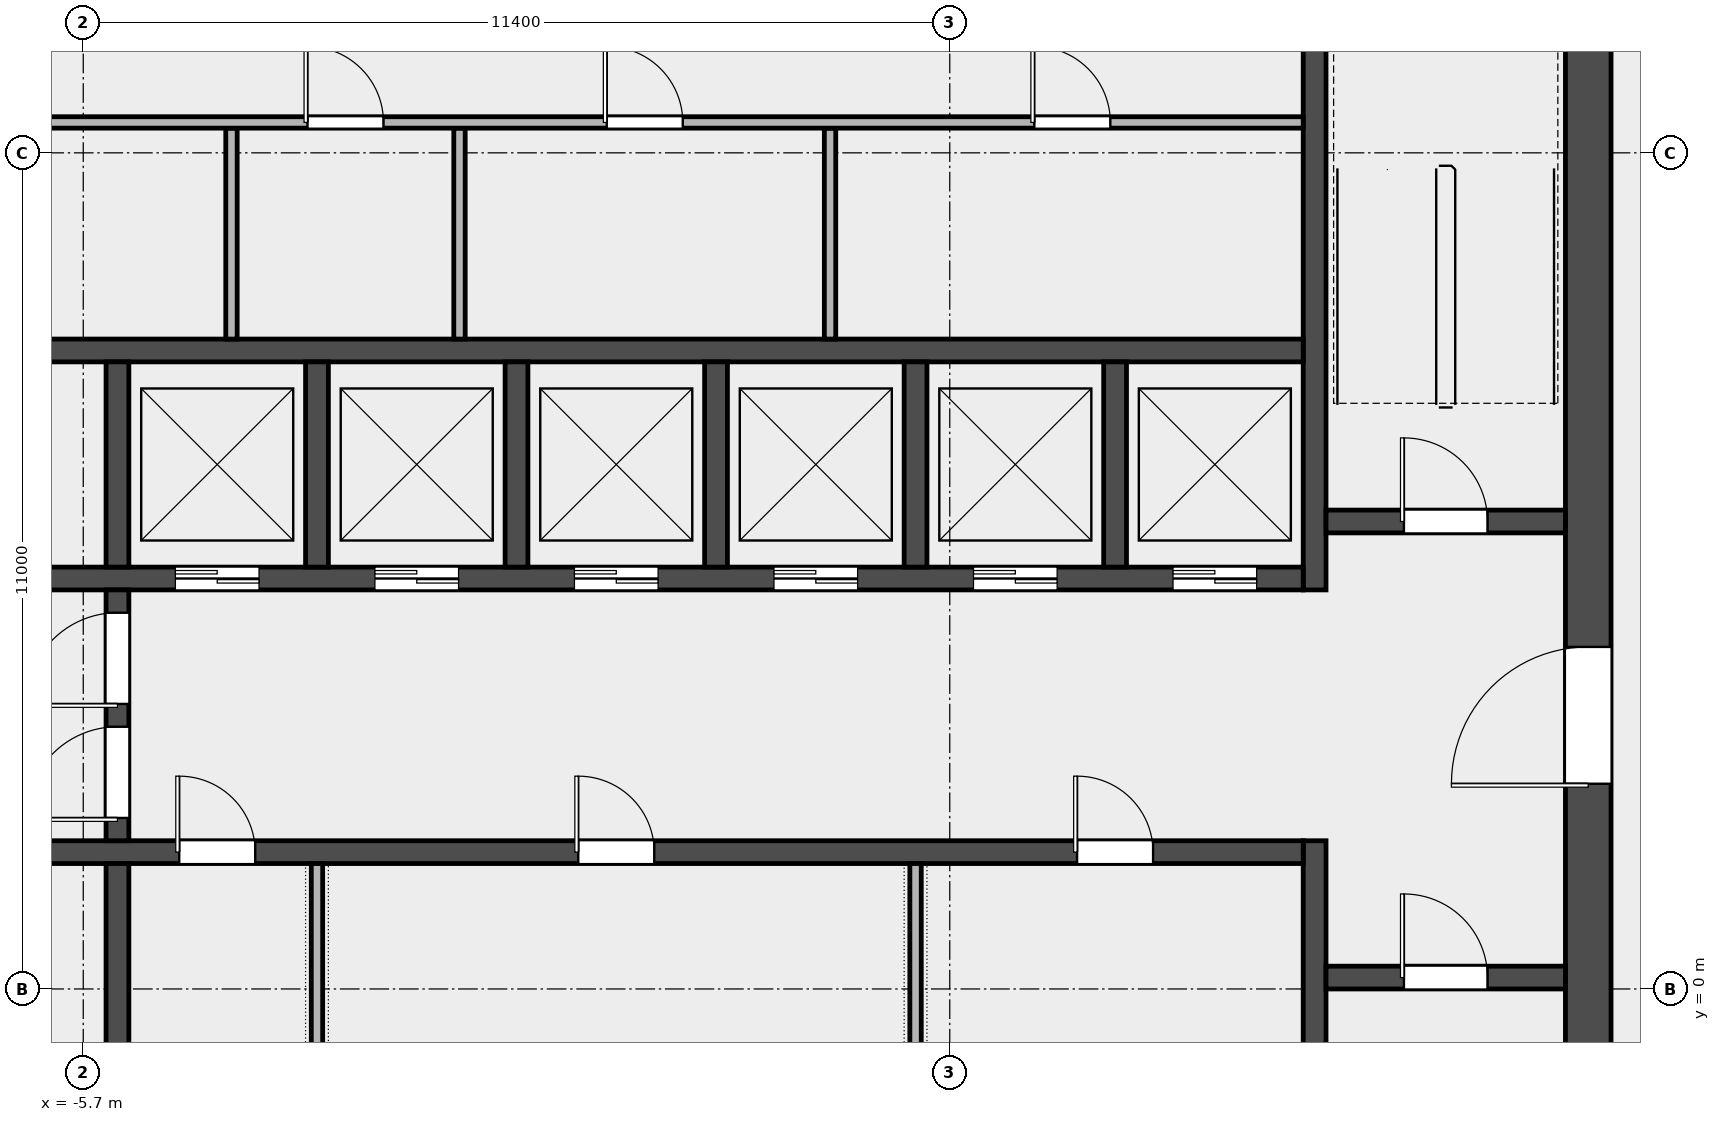
"""IFC4 building model, lengths in metres.
Left out: names, types, materials, properties, quantities, classifications, styles, units other than length and angle.
Written with IfcOpenShell. Run it as: python <this file> out.ifc"""

import sys

from ifc_helpers import new_model, si_unit, direction, frame, frame_2d, origin, place, context, subcontext, project, spatial, rectangle, extrude, element, fill, save


model = new_model("IFC4")
c1 = context("Model", 3, precision=1e-05, world=origin(), true_north=direction((0.0, 1.0)))
c2 = subcontext(c1, "Body", "Model", "MODEL_VIEW")
j1 = project(units=[si_unit("LENGTHUNIT", "METRE"), si_unit("PLANEANGLEUNIT", "RADIAN")], contexts=[c1])
p1 = place(None, origin())
s1 = spatial("IfcSite", under=j1, at=p1, CompositionType="ELEMENT")
p2 = place(p1, origin())
s2 = spatial("IfcBuilding", under=s1, at=p2, CompositionType="ELEMENT")
p3 = place(p2, frame((0.0, 0.0, 283.4)))
s3 = spatial("IfcBuildingStorey", under=s2, at=p3, CompositionType="ELEMENT", Elevation=283.4)
p4 = place(p3, frame((14.1, -6.6, 0.0), z_axis=(0.0, 0.0, 1.0), x_axis=(0.0, 1.0, 0.0)))
e1 = element("IfcWall", 1, at=p4, inside=s3, PredefinedType="SHEAR", context=c2, shape_type="SweptSolid", body=[
    extrude(rectangle(XDim=19.5, YDim=0.6, at=frame_2d((9.75, 0.0))), origin(), (0.0, 0.0, 1.0), 3.7),
])
p5 = place(p4, frame((9.3, 0.0, 0.0)))
e2 = element("IfcOpeningElement", 2, at=p5, cuts=e1, PredefinedType="OPENING", context=c2, shape_type="SweptSolid", body=[
    extrude(rectangle(XDim=1.8, YDim=2.1, at=frame_2d((0.9, 1.05))), frame((0.0, 0.312, 0.0), z_axis=(0.0, -1.0, 0.0), x_axis=(1.0, 0.0, 0.0)), (0.0, 0.0, 1.0), 0.624),
])
p6 = place(p3, frame((10.5, -6.6, 0.0), z_axis=(0.0, 0.0, 1.0), x_axis=(0.0, 1.0, 0.0)))
e3 = element("IfcWall", 3, at=p6, inside=s3, PredefinedType="SHEAR", context=c2, shape_type="SweptSolid", body=[
    extrude(rectangle(XDim=8.55, YDim=0.3, at=frame_2d((4.275, 0.0))), origin(), (0.0, 0.0, 1.0), 3.7),
])
p7 = place(p3, frame((10.5, 5.25, 0.0), z_axis=(0.0, 0.0, 1.0), x_axis=(0.0, 1.0, 0.0)))
e4 = element("IfcWall", 4, at=p7, inside=s3, PredefinedType="SHEAR", context=c2, shape_type="SweptSolid", body=[
    extrude(rectangle(XDim=7.65, YDim=0.3, at=frame_2d((3.825, 0.0))), origin(), (0.0, 0.0, 1.0), 3.7),
])
p8 = place(p3, frame((10.65, 0.15, 0.0), z_axis=(0.0, 0.0, 1.0), x_axis=(1.0, 0.0, 0.0)))
e5 = element("IfcWall", 5, at=p8, inside=s3, PredefinedType="SOLIDWALL", context=c2, shape_type="SweptSolid", body=[
    extrude(rectangle(XDim=3.15, YDim=0.3, at=frame_2d((1.575, 0.0))), origin(), (0.0, 0.0, 1.0), 3.7),
])
p9 = place(p8, frame((1.025, 0.0, 0.0)))
e6 = element("IfcOpeningElement", 6, at=p9, cuts=e5, PredefinedType="OPENING", context=c2, shape_type="SweptSolid", body=[
    extrude(rectangle(XDim=1.1, YDim=2.1, at=frame_2d((0.55, 1.05))), frame((0.0, 0.162, 0.0), z_axis=(0.0, -1.0, 0.0), x_axis=(1.0, 0.0, 0.0)), (0.0, 0.0, 1.0), 0.324),
])
p10 = place(p3, frame((10.65, 6.15, 0.0), z_axis=(0.0, 0.0, 1.0), x_axis=(1.0, 0.0, 0.0)))
e7 = element("IfcWall", 7, at=p10, inside=s3, PredefinedType="SOLIDWALL", context=c2, shape_type="SweptSolid", body=[
    extrude(rectangle(XDim=3.15, YDim=0.3, at=frame_2d((1.575, 0.0))), origin(), (0.0, 0.0, 1.0), 3.7),
])
p11 = place(p10, frame((1.025, 0.0, 0.0)))
e8 = element("IfcOpeningElement", 8, at=p11, cuts=e7, PredefinedType="OPENING", context=c2, shape_type="SweptSolid", body=[
    extrude(rectangle(XDim=1.1, YDim=2.1, at=frame_2d((0.55, 1.05))), frame((0.0, 0.162, 0.0), z_axis=(0.0, -1.0, 0.0), x_axis=(1.0, 0.0, 0.0)), (0.0, 0.0, 1.0), 0.324),
])
p12 = place(p3, frame((-10.35, 1.8, 0.0), z_axis=(0.0, 0.0, 1.0), x_axis=(1.0, 0.0, 0.0)))
e9 = element("IfcWall", 9, at=p12, inside=s3, PredefinedType="SOLIDWALL", context=c2, shape_type="SweptSolid", body=[
    extrude(rectangle(XDim=20.7, YDim=0.3, at=frame_2d((10.35, 0.0))), origin(), (0.0, 0.0, 1.0), 3.7),
])
p13 = place(p12, frame((0.512, 0.0, 0.0)))
e10 = element("IfcOpeningElement", 10, at=p13, cuts=e9, PredefinedType="OPENING", context=c2, shape_type="SweptSolid", body=[
    extrude(rectangle(XDim=1.3, YDim=2.1, at=frame_2d((0.65, 1.05))), frame((0.0, 0.162, 0.0), z_axis=(0.0, -1.0, 0.0), x_axis=(1.0, 0.0, 0.0)), (0.0, 0.0, 1.0), 0.324),
])
p14 = place(p12, frame((5.913, 0.0, 0.0)))
e11 = element("IfcOpeningElement", 11, at=p14, cuts=e9, PredefinedType="OPENING", context=c2, shape_type="SweptSolid", body=[
    extrude(rectangle(XDim=1.0, YDim=2.1, at=frame_2d((0.5, 1.05))), frame((0.0, 0.162, 0.0), z_axis=(0.0, -1.0, 0.0), x_axis=(1.0, 0.0, 0.0)), (0.0, 0.0, 1.0), 0.324),
])
p15 = place(p12, frame((11.163, 0.0, 0.0)))
e12 = element("IfcOpeningElement", 12, at=p15, cuts=e9, PredefinedType="OPENING", context=c2, shape_type="SweptSolid", body=[
    extrude(rectangle(XDim=1.0, YDim=2.1, at=frame_2d((0.5, 1.05))), frame((0.0, 0.162, 0.0), z_axis=(0.0, -1.0, 0.0), x_axis=(1.0, 0.0, 0.0)), (0.0, 0.0, 1.0), 0.324),
])
p16 = place(p12, frame((17.725, 0.0, 0.0)))
e13 = element("IfcOpeningElement", 13, at=p16, cuts=e9, PredefinedType="OPENING", context=c2, shape_type="SweptSolid", body=[
    extrude(rectangle(XDim=1.0, YDim=2.1, at=frame_2d((0.5, 1.05))), frame((0.0, 0.162, 0.0), z_axis=(0.0, -1.0, 0.0), x_axis=(1.0, 0.0, 0.0)), (0.0, 0.0, 1.0), 0.324),
])
p17 = place(p3, frame((-10.35, 5.4, 0.0), z_axis=(0.0, 0.0, 1.0), x_axis=(1.0, 0.0, 0.0)))
e14 = element("IfcWall", 14, at=p17, inside=s3, PredefinedType="SOLIDWALL", context=c2, shape_type="SweptSolid", body=[
    extrude(rectangle(XDim=20.7, YDim=0.3, at=frame_2d((10.35, 0.0))), origin(), (0.0, 0.0, 1.0), 3.7),
])
p18 = place(p17, frame((0.512, 0.0, 0.0)))
e15 = element("IfcOpeningElement", 15, at=p18, cuts=e14, PredefinedType="OPENING", context=c2, shape_type="SweptSolid", body=[
    extrude(rectangle(XDim=1.3, YDim=2.1, at=frame_2d((0.65, 1.05))), frame((0.0, 0.162, 0.0), z_axis=(0.0, -1.0, 0.0), x_axis=(1.0, 0.0, 0.0)), (0.0, 0.0, 1.0), 0.324),
])
p19 = place(p17, frame((5.863, 0.0, 0.0)))
e16 = element("IfcOpeningElement", 16, at=p19, cuts=e14, PredefinedType="OPENING", context=c2, shape_type="SweptSolid", body=[
    extrude(rectangle(XDim=1.1, YDim=2.1, at=frame_2d((0.55, 1.05))), frame((0.0, 0.162, 0.0), z_axis=(0.0, -1.0, 0.0), x_axis=(1.0, 0.0, 0.0)), (0.0, 0.0, 1.0), 0.324),
])
p20 = place(p17, frame((8.488, 0.0, 0.0)))
e17 = element("IfcOpeningElement", 17, at=p20, cuts=e14, PredefinedType="OPENING", context=c2, shape_type="SweptSolid", body=[
    extrude(rectangle(XDim=1.1, YDim=2.1, at=frame_2d((0.55, 1.05))), frame((0.0, 0.162, 0.0), z_axis=(0.0, -1.0, 0.0), x_axis=(1.0, 0.0, 0.0)), (0.0, 0.0, 1.0), 0.324),
])
p21 = place(p17, frame((11.113, 0.0, 0.0)))
e18 = element("IfcOpeningElement", 18, at=p21, cuts=e14, PredefinedType="OPENING", context=c2, shape_type="SweptSolid", body=[
    extrude(rectangle(XDim=1.1, YDim=2.1, at=frame_2d((0.55, 1.05))), frame((0.0, 0.162, 0.0), z_axis=(0.0, -1.0, 0.0), x_axis=(1.0, 0.0, 0.0)), (0.0, 0.0, 1.0), 0.324),
])
p22 = place(p17, frame((13.738, 0.0, 0.0)))
e19 = element("IfcOpeningElement", 19, at=p22, cuts=e14, PredefinedType="OPENING", context=c2, shape_type="SweptSolid", body=[
    extrude(rectangle(XDim=1.1, YDim=2.1, at=frame_2d((0.55, 1.05))), frame((0.0, 0.162, 0.0), z_axis=(0.0, -1.0, 0.0), x_axis=(1.0, 0.0, 0.0)), (0.0, 0.0, 1.0), 0.324),
])
p23 = place(p17, frame((16.363, 0.0, 0.0)))
e20 = element("IfcOpeningElement", 20, at=p23, cuts=e14, PredefinedType="OPENING", context=c2, shape_type="SweptSolid", body=[
    extrude(rectangle(XDim=1.1, YDim=2.1, at=frame_2d((0.55, 1.05))), frame((0.0, 0.162, 0.0), z_axis=(0.0, -1.0, 0.0), x_axis=(1.0, 0.0, 0.0)), (0.0, 0.0, 1.0), 0.324),
])
p24 = place(p17, frame((18.988, 0.0, 0.0)))
e21 = element("IfcOpeningElement", 21, at=p24, cuts=e14, PredefinedType="OPENING", context=c2, shape_type="SweptSolid", body=[
    extrude(rectangle(XDim=1.1, YDim=2.1, at=frame_2d((0.55, 1.05))), frame((0.0, 0.162, 0.0), z_axis=(0.0, -1.0, 0.0), x_axis=(1.0, 0.0, 0.0)), (0.0, 0.0, 1.0), 0.324),
])
p25 = place(p3, frame((-10.35, 8.4, 0.0), z_axis=(0.0, 0.0, 1.0), x_axis=(1.0, 0.0, 0.0)))
e22 = element("IfcWall", 22, at=p25, inside=s3, PredefinedType="SOLIDWALL", context=c2, shape_type="SweptSolid", body=[
    extrude(rectangle(XDim=20.7, YDim=0.3, at=frame_2d((10.35, 0.0))), origin(), (0.0, 0.0, 1.0), 3.7),
])
for number, where, z_axis, x_axis in (
    (23, (-5.25, -1.05, 0.0), (0.0, 0.0, 1.0), (0.0, 1.0, 0.0)),
    (24, (-5.25, 5.55, 0.0), (0.0, 0.0, 1.0), (0.0, 1.0, 0.0)),
    (25, (-2.625, 5.55, 0.0), (0.0, 0.0, 1.0), (0.0, 1.0, 0.0)),
    (26, (0.0, 5.55, 0.0), (0.0, 0.0, 1.0), (0.0, 1.0, 0.0)),
    (27, (2.625, 5.55, 0.0), (0.0, 0.0, 1.0), (0.0, 1.0, 0.0)),
    (28, (5.25, 5.55, 0.0), (0.0, 0.0, 1.0), (0.0, 1.0, 0.0)),
    (29, (7.875, 5.55, 0.0), (0.0, 0.0, 1.0), (0.0, 1.0, 0.0)),
):
    element("IfcWall", number, at=place(p3, frame(where, z_axis=z_axis, x_axis=x_axis)), inside=s3, PredefinedType="SOLIDWALL", context=c2, shape_type="SweptSolid", body=[
        extrude(rectangle(XDim=2.7, YDim=0.3, at=frame_2d((1.35, 0.0))), origin(), (0.0, 0.0, 1.0), 3.7),
    ])
p26 = place(p3, frame((-5.25, 1.95, 0.0), z_axis=(0.0, 0.0, 1.0), x_axis=(0.0, 1.0, 0.0)))
e30 = element("IfcWall", 30, at=p26, inside=s3, PredefinedType="SOLIDWALL", context=c2, shape_type="SweptSolid", body=[
    extrude(rectangle(XDim=3.3, YDim=0.3, at=frame_2d((1.65, 0.0))), origin(), (0.0, 0.0, 1.0), 3.7),
])
p27 = place(p26, frame((0.3, 0.0, 0.0)))
e31 = element("IfcOpeningElement", 31, at=p27, cuts=e30, PredefinedType="OPENING", context=c2, shape_type="SweptSolid", body=[
    extrude(rectangle(XDim=1.2, YDim=2.1, at=frame_2d((0.6, 1.05))), frame((0.0, 0.162, 0.0), z_axis=(0.0, -1.0, 0.0), x_axis=(1.0, 0.0, 0.0)), (0.0, 0.0, 1.0), 0.324),
])
p28 = place(p26, frame((1.8, 0.0, 0.0)))
e32 = element("IfcOpeningElement", 32, at=p28, cuts=e30, PredefinedType="OPENING", context=c2, shape_type="SweptSolid", body=[
    extrude(rectangle(XDim=1.2, YDim=2.1, at=frame_2d((0.6, 1.05))), frame((0.0, 0.162, 0.0), z_axis=(0.0, -1.0, 0.0), x_axis=(1.0, 0.0, 0.0)), (0.0, 0.0, 1.0), 0.324),
])
for number, where, z_axis, x_axis in (
    (33, (-3.75, 8.55, 0.0), (0.0, 0.0, 1.0), (0.0, 1.0, 0.0)),
    (34, (-0.75, 8.55, 0.0), (0.0, 0.0, 1.0), (0.0, 1.0, 0.0)),
    (35, (4.125, 8.55, 0.0), (0.0, 0.0, 1.0), (0.0, 1.0, 0.0)),
):
    element("IfcWall", number, at=place(p3, frame(where, z_axis=z_axis, x_axis=x_axis)), inside=s3, PredefinedType="PARTITIONING", context=c2, shape_type="SweptSolid", body=[
        extrude(rectangle(XDim=2.775, YDim=0.15, at=frame_2d((1.387, 0.0))), origin(), (0.0, 0.0, 1.0), 3.7),
    ])
p29 = place(p3, frame((-10.35, 11.4, 0.0), z_axis=(0.0, 0.0, 1.0), x_axis=(1.0, 0.0, 0.0)))
e36 = element("IfcWall", 36, at=p29, inside=s3, PredefinedType="PARTITIONING", context=c2, shape_type="SweptSolid", body=[
    extrude(rectangle(XDim=20.7, YDim=0.15, at=frame_2d((10.35, 0.0))), origin(), (0.0, 0.0, 1.0), 3.7),
])
p30 = place(p29, frame((2.725, 0.0, 0.0)))
e37 = element("IfcOpeningElement", 37, at=p30, cuts=e36, PredefinedType="OPENING", context=c2, shape_type="SweptSolid", body=[
    extrude(rectangle(XDim=1.0, YDim=2.1, at=frame_2d((0.5, 1.05))), frame((0.0, 0.087, 0.0), z_axis=(0.0, -1.0, 0.0), x_axis=(1.0, 0.0, 0.0)), (0.0, 0.0, 1.0), 0.174),
])
p31 = place(p29, frame((7.6, 0.0, 0.0)))
e38 = element("IfcOpeningElement", 38, at=p31, cuts=e36, PredefinedType="OPENING", context=c2, shape_type="SweptSolid", body=[
    extrude(rectangle(XDim=1.0, YDim=2.1, at=frame_2d((0.5, 1.05))), frame((0.0, 0.087, 0.0), z_axis=(0.0, -1.0, 0.0), x_axis=(1.0, 0.0, 0.0)), (0.0, 0.0, 1.0), 0.174),
])
p32 = place(p29, frame((11.538, 0.0, 0.0)))
e39 = element("IfcOpeningElement", 39, at=p32, cuts=e36, PredefinedType="OPENING", context=c2, shape_type="SweptSolid", body=[
    extrude(rectangle(XDim=1.0, YDim=2.1, at=frame_2d((0.5, 1.05))), frame((0.0, 0.087, 0.0), z_axis=(0.0, -1.0, 0.0), x_axis=(1.0, 0.0, 0.0)), (0.0, 0.0, 1.0), 0.174),
])
p33 = place(p29, frame((17.163, 0.0, 0.0)))
e40 = element("IfcOpeningElement", 40, at=p33, cuts=e36, PredefinedType="OPENING", context=c2, shape_type="SweptSolid", body=[
    extrude(rectangle(XDim=1.0, YDim=2.1, at=frame_2d((0.5, 1.05))), frame((0.0, 0.087, 0.0), z_axis=(0.0, -1.0, 0.0), x_axis=(1.0, 0.0, 0.0)), (0.0, 0.0, 1.0), 0.174),
])
for number, where, z_axis, x_axis in (
    (41, (-2.625, -1.05, 0.0), (0.0, 0.0, 1.0), (0.0, 1.0, 0.0)),
    (42, (5.25, -1.05, 0.0), (0.0, 0.0, 1.0), (0.0, 1.0, 0.0)),
):
    element("IfcWall", number, at=place(p3, frame(where, z_axis=z_axis, x_axis=x_axis)), inside=s3, PredefinedType="PARTITIONING", context=c2, shape_type="SweptSolid", body=[
        extrude(rectangle(XDim=2.7, YDim=0.15, at=frame_2d((1.35, 0.0))), origin(), (0.0, 0.0, 1.0), 3.7),
    ])
p34 = place(p9, origin())
e43 = element("IfcDoor", 43, at=p34, inside=s3, OperationType="SINGLE_SWING_RIGHT", PredefinedType="DOOR", context=c2, shape_type="SweptSolid", body=[
    extrude(rectangle(XDim=1.1, YDim=2.1, at=frame_2d((0.55, 1.05))), frame((0.0, 0.025, 0.0), z_axis=(0.0, -1.0, 0.0), x_axis=(1.0, 0.0, 0.0)), (0.0, 0.0, 1.0), 0.05),
])
fill(e6, e43)
p35 = place(p11, origin())
e44 = element("IfcDoor", 44, at=p35, inside=s3, OperationType="SINGLE_SWING_RIGHT", PredefinedType="DOOR", context=c2, shape_type="SweptSolid", body=[
    extrude(rectangle(XDim=1.1, YDim=2.1, at=frame_2d((0.55, 1.05))), frame((0.0, 0.025, 0.0), z_axis=(0.0, -1.0, 0.0), x_axis=(1.0, 0.0, 0.0)), (0.0, 0.0, 1.0), 0.05),
])
fill(e8, e44)
p36 = place(p5, origin())
e45 = element("IfcDoor", 45, at=p36, inside=s3, OperationType="DOUBLE_DOOR_SINGLE_SWING", PredefinedType="DOOR", context=c2, shape_type="SweptSolid", body=[
    extrude(rectangle(XDim=1.8, YDim=2.1, at=frame_2d((0.9, 1.05))), frame((0.0, 0.025, 0.0), z_axis=(0.0, -1.0, 0.0), x_axis=(1.0, 0.0, 0.0)), (0.0, 0.0, 1.0), 0.05),
])
fill(e2, e45)
p37 = place(p27, origin())
e46 = element("IfcDoor", 46, at=p37, inside=s3, OperationType="SINGLE_SWING_LEFT", PredefinedType="DOOR", context=c2, shape_type="SweptSolid", body=[
    extrude(rectangle(XDim=1.2, YDim=2.1, at=frame_2d((0.6, 1.05))), frame((0.0, 0.025, 0.0), z_axis=(0.0, -1.0, 0.0), x_axis=(1.0, 0.0, 0.0)), (0.0, 0.0, 1.0), 0.05),
])
fill(e31, e46)
p38 = place(p28, origin())
e47 = element("IfcDoor", 47, at=p38, inside=s3, OperationType="SINGLE_SWING_RIGHT", PredefinedType="DOOR", context=c2, shape_type="SweptSolid", body=[
    extrude(rectangle(XDim=1.2, YDim=2.1, at=frame_2d((0.6, 1.05))), frame((0.0, 0.025, 0.0), z_axis=(0.0, -1.0, 0.0), x_axis=(1.0, 0.0, 0.0)), (0.0, 0.0, 1.0), 0.05),
])
fill(e32, e47)
p39 = place(p19, origin())
e48 = element("IfcDoor", 48, at=p39, inside=s3, OperationType="DOUBLE_DOOR_SLIDING", PredefinedType="DOOR", context=c2, shape_type="SweptSolid", body=[
    extrude(rectangle(XDim=1.1, YDim=2.1, at=frame_2d((0.55, 1.05))), frame((0.0, 0.025, 0.0), z_axis=(0.0, -1.0, 0.0), x_axis=(1.0, 0.0, 0.0)), (0.0, 0.0, 1.0), 0.05),
])
fill(e16, e48)
p40 = place(p20, origin())
e49 = element("IfcDoor", 49, at=p40, inside=s3, OperationType="DOUBLE_DOOR_SLIDING", PredefinedType="DOOR", context=c2, shape_type="SweptSolid", body=[
    extrude(rectangle(XDim=1.1, YDim=2.1, at=frame_2d((0.55, 1.05))), frame((0.0, 0.025, 0.0), z_axis=(0.0, -1.0, 0.0), x_axis=(1.0, 0.0, 0.0)), (0.0, 0.0, 1.0), 0.05),
])
fill(e17, e49)
p41 = place(p21, origin())
e50 = element("IfcDoor", 50, at=p41, inside=s3, OperationType="DOUBLE_DOOR_SLIDING", PredefinedType="DOOR", context=c2, shape_type="SweptSolid", body=[
    extrude(rectangle(XDim=1.1, YDim=2.1, at=frame_2d((0.55, 1.05))), frame((0.0, 0.025, 0.0), z_axis=(0.0, -1.0, 0.0), x_axis=(1.0, 0.0, 0.0)), (0.0, 0.0, 1.0), 0.05),
])
fill(e18, e50)
p42 = place(p22, origin())
e51 = element("IfcDoor", 51, at=p42, inside=s3, OperationType="DOUBLE_DOOR_SLIDING", PredefinedType="DOOR", context=c2, shape_type="SweptSolid", body=[
    extrude(rectangle(XDim=1.1, YDim=2.1, at=frame_2d((0.55, 1.05))), frame((0.0, 0.025, 0.0), z_axis=(0.0, -1.0, 0.0), x_axis=(1.0, 0.0, 0.0)), (0.0, 0.0, 1.0), 0.05),
])
fill(e19, e51)
p43 = place(p23, origin())
e52 = element("IfcDoor", 52, at=p43, inside=s3, OperationType="DOUBLE_DOOR_SLIDING", PredefinedType="DOOR", context=c2, shape_type="SweptSolid", body=[
    extrude(rectangle(XDim=1.1, YDim=2.1, at=frame_2d((0.55, 1.05))), frame((0.0, 0.025, 0.0), z_axis=(0.0, -1.0, 0.0), x_axis=(1.0, 0.0, 0.0)), (0.0, 0.0, 1.0), 0.05),
])
fill(e20, e52)
p44 = place(p24, origin())
e53 = element("IfcDoor", 53, at=p44, inside=s3, OperationType="DOUBLE_DOOR_SLIDING", PredefinedType="DOOR", context=c2, shape_type="SweptSolid", body=[
    extrude(rectangle(XDim=1.1, YDim=2.1, at=frame_2d((0.55, 1.05))), frame((0.0, 0.025, 0.0), z_axis=(0.0, -1.0, 0.0), x_axis=(1.0, 0.0, 0.0)), (0.0, 0.0, 1.0), 0.05),
])
fill(e21, e53)
p45 = place(p31, origin())
e54 = element("IfcDoor", 54, at=p45, inside=s3, OperationType="SINGLE_SWING_LEFT", PredefinedType="DOOR", context=c2, shape_type="SweptSolid", body=[
    extrude(rectangle(XDim=1.0, YDim=2.1, at=frame_2d((0.5, 1.05))), frame((0.0, 0.025, 0.0), z_axis=(0.0, -1.0, 0.0), x_axis=(1.0, 0.0, 0.0)), (0.0, 0.0, 1.0), 0.05),
])
fill(e38, e54)
p46 = place(p32, origin())
e55 = element("IfcDoor", 55, at=p46, inside=s3, OperationType="SINGLE_SWING_LEFT", PredefinedType="DOOR", context=c2, shape_type="SweptSolid", body=[
    extrude(rectangle(XDim=1.0, YDim=2.1, at=frame_2d((0.5, 1.05))), frame((0.0, 0.025, 0.0), z_axis=(0.0, -1.0, 0.0), x_axis=(1.0, 0.0, 0.0)), (0.0, 0.0, 1.0), 0.05),
])
fill(e39, e55)
p47 = place(p33, origin())
e56 = element("IfcDoor", 56, at=p47, inside=s3, OperationType="SINGLE_SWING_LEFT", PredefinedType="DOOR", context=c2, shape_type="SweptSolid", body=[
    extrude(rectangle(XDim=1.0, YDim=2.1, at=frame_2d((0.5, 1.05))), frame((0.0, 0.025, 0.0), z_axis=(0.0, -1.0, 0.0), x_axis=(1.0, 0.0, 0.0)), (0.0, 0.0, 1.0), 0.05),
])
fill(e40, e56)
p48 = place(p14, origin())
e57 = element("IfcDoor", 57, at=p48, inside=s3, OperationType="SINGLE_SWING_LEFT", PredefinedType="DOOR", context=c2, shape_type="SweptSolid", body=[
    extrude(rectangle(XDim=1.0, YDim=2.1, at=frame_2d((0.5, 1.05))), frame((0.0, 0.025, 0.0), z_axis=(0.0, -1.0, 0.0), x_axis=(1.0, 0.0, 0.0)), (0.0, 0.0, 1.0), 0.05),
])
fill(e11, e57)
p49 = place(p15, origin())
e58 = element("IfcDoor", 58, at=p49, inside=s3, OperationType="SINGLE_SWING_LEFT", PredefinedType="DOOR", context=c2, shape_type="SweptSolid", body=[
    extrude(rectangle(XDim=1.0, YDim=2.1, at=frame_2d((0.5, 1.05))), frame((0.0, 0.025, 0.0), z_axis=(0.0, -1.0, 0.0), x_axis=(1.0, 0.0, 0.0)), (0.0, 0.0, 1.0), 0.05),
])
fill(e12, e58)
p50 = place(p16, origin())
e59 = element("IfcDoor", 59, at=p50, inside=s3, OperationType="SINGLE_SWING_LEFT", PredefinedType="DOOR", context=c2, shape_type="SweptSolid", body=[
    extrude(rectangle(XDim=1.0, YDim=2.1, at=frame_2d((0.5, 1.05))), frame((0.0, 0.025, 0.0), z_axis=(0.0, -1.0, 0.0), x_axis=(1.0, 0.0, 0.0)), (0.0, 0.0, 1.0), 0.05),
])
fill(e13, e59)
save(model, sys.argv[1])
